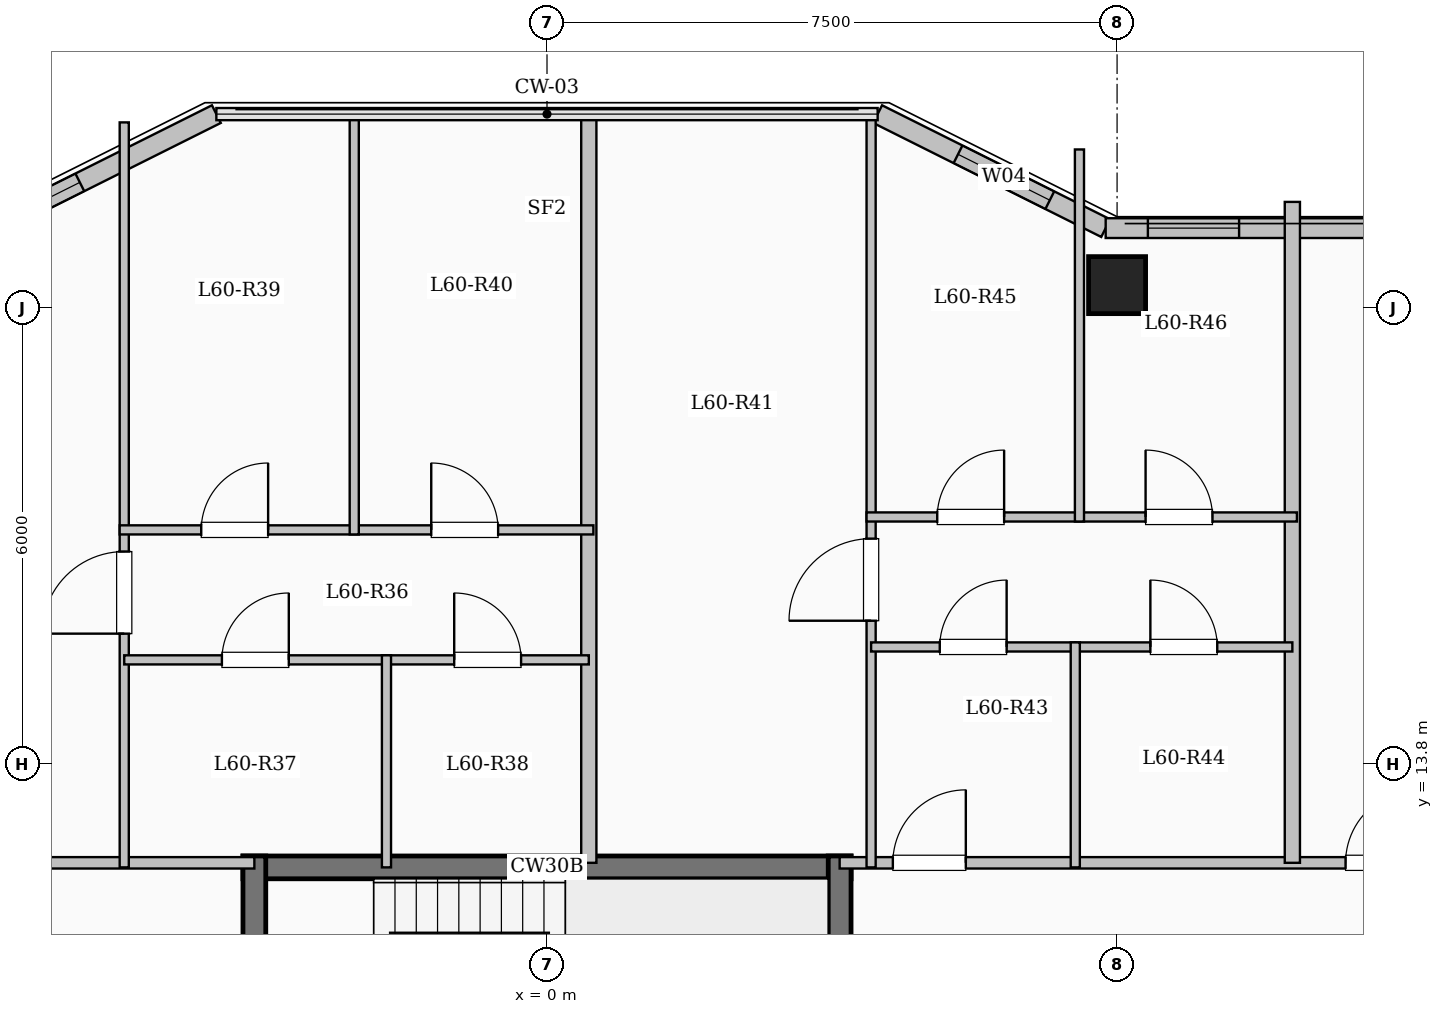
"""IFC4 building model, lengths in metres.
Left out: names, types, materials, properties, quantities, classifications, styles, units other than length and angle.
Written with IfcOpenShell. Run it as: python <this file> out.ifc"""

import sys

from ifc_helpers import new_model, si_unit, direction, frame, frame_2d, origin, origin_2d, place, context, subcontext, project, spatial, rectangle, extrude, element, fill, save


model = new_model("IFC4")
c1 = context("Model", 3, precision=1e-05, world=origin(), true_north=direction((0.0, 1.0)))
c2 = subcontext(c1, "Body", "Model", "MODEL_VIEW")
j1 = project(units=[si_unit("LENGTHUNIT", "METRE"), si_unit("PLANEANGLEUNIT", "RADIAN")], contexts=[c1])
p1 = place(None, origin())
s1 = spatial("IfcSite", under=j1, at=p1, CompositionType="ELEMENT")
p2 = place(p1, origin())
s2 = spatial("IfcBuilding", under=s1, at=p2, CompositionType="ELEMENT")
p3 = place(p2, frame((0.0, 0.0, 220.4)))
s3 = spatial("IfcBuildingStorey", under=s2, at=p3, CompositionType="ELEMENT", Elevation=220.4)
p4 = place(p3, frame((7.5, 20.1, 0.0), z_axis=(0.0, 0.0, 1.0), x_axis=(1.0, 0.0, 0.0)))
e1 = element("IfcColumn", 1, at=p4, inside=s3, PredefinedType="COLUMN", context=c2, shape_type="SweptSolid", body=[
    extrude(rectangle(XDim=0.75, YDim=0.75, at=origin_2d()), origin(), (0.0, 0.0, 1.0), 3.35),
])
p5 = place(p3, frame((-7.35, 20.85, 0.0), z_axis=(0.0, 0.0, 1.0), x_axis=(0.894427191, 0.4472135955, 0.0)))
e2 = element("IfcWall", 2, at=p5, inside=s3, PredefinedType="SOLIDWALL", context=c2, shape_type="SweptSolid", body=[
    extrude(rectangle(XDim=3.354, YDim=0.26, at=frame_2d((1.677, 0.0))), origin(), (0.0, 0.0, 1.0), 3.1),
])
p6 = place(p5, frame((0.346, 0.0, 0.95)))
e3 = element("IfcOpeningElement", 3, at=p6, cuts=e2, PredefinedType="OPENING", context=c2, shape_type="SweptSolid", body=[
    extrude(rectangle(XDim=1.0, YDim=1.5, at=frame_2d((0.5, 0.75))), frame((0.0, 0.14, 0.0), z_axis=(0.0, -1.0, 0.0), x_axis=(1.0, 0.0, 0.0)), (0.0, 0.0, 1.0), 0.28),
])
p7 = place(p3, frame((4.35, 22.35, 0.0), z_axis=(0.0, 0.0, 1.0), x_axis=(0.894427191, -0.4472135955, 0.0)))
e4 = element("IfcWall", 4, at=p7, inside=s3, PredefinedType="SOLIDWALL", context=c2, shape_type="SweptSolid", body=[
    extrude(rectangle(XDim=3.354, YDim=0.26, at=frame_2d((1.677, 0.0))), origin(), (0.0, 0.0, 1.0), 3.1),
])
p8 = place(p7, frame((1.182, 0.0, 0.95)))
e5 = element("IfcOpeningElement", 5, at=p8, cuts=e4, PredefinedType="OPENING", context=c2, shape_type="SweptSolid", body=[
    extrude(rectangle(XDim=1.35, YDim=1.55, at=frame_2d((0.675, 0.775))), frame((0.0, 0.14, 0.0), z_axis=(0.0, -1.0, 0.0), x_axis=(1.0, 0.0, 0.0)), (0.0, 0.0, 1.0), 0.28),
])
p9 = place(p3, frame((7.35, 20.85, 0.0), z_axis=(0.0, 0.0, 1.0), x_axis=(1.0, 0.0, 0.0)))
e6 = element("IfcWall", 6, at=p9, inside=s3, PredefinedType="SOLIDWALL", context=c2, shape_type="SweptSolid", body=[
    extrude(rectangle(XDim=11.1, YDim=0.26, at=frame_2d((5.55, 0.0))), origin(), (0.0, 0.0, 1.0), 3.1),
])
p10 = place(p9, frame((0.555, 0.0, 0.95)))
e7 = element("IfcOpeningElement", 7, at=p10, cuts=e6, PredefinedType="OPENING", context=c2, shape_type="SweptSolid", body=[
    extrude(rectangle(XDim=1.2, YDim=1.5, at=frame_2d((0.6, 0.75))), frame((0.0, 0.14, 0.0), z_axis=(0.0, -1.0, 0.0), x_axis=(1.0, 0.0, 0.0)), (0.0, 0.0, 1.0), 0.28),
])
p11 = place(p9, frame((3.471, 0.0, 0.9)))
e8 = element("IfcOpeningElement", 8, at=p11, cuts=e6, PredefinedType="OPENING", context=c2, shape_type="SweptSolid", body=[
    extrude(rectangle(XDim=2.2, YDim=1.75, at=frame_2d((1.1, 0.875))), frame((0.0, 0.14, 0.0), z_axis=(0.0, -1.0, 0.0), x_axis=(1.0, 0.0, 0.0)), (0.0, 0.0, 1.0), 0.28),
])
p12 = place(p9, frame((8.04, 0.0, 0.9)))
e9 = element("IfcOpeningElement", 9, at=p12, cuts=e6, PredefinedType="OPENING", context=c2, shape_type="SweptSolid", body=[
    extrude(rectangle(XDim=1.65, YDim=1.6, at=frame_2d((0.825, 0.8))), frame((0.0, 0.14, 0.0), z_axis=(0.0, -1.0, 0.0), x_axis=(1.0, 0.0, 0.0)), (0.0, 0.0, 1.0), 0.28),
])
p13 = place(p3, frame((-4.0, 12.44, 0.0), z_axis=(0.0, 0.0, 1.0), x_axis=(1.0, 0.0, 0.0)))
e10 = element("IfcWall", 10, at=p13, inside=s3, PredefinedType="SHEAR", context=c2, shape_type="SweptSolid", body=[
    extrude(rectangle(XDim=8.0, YDim=0.3, at=frame_2d((4.0, 0.0))), origin(), (0.0, 0.0, 1.0), 3.35),
])
for number, where, z_axis, x_axis in (
    (11, (-3.85, 9.0, 0.0), (0.0, 0.0, 1.0), (0.0, 1.0, 0.0)),
    (12, (3.85, 9.0, 0.0), (0.0, 0.0, 1.0), (0.0, 1.0, 0.0)),
):
    element("IfcWall", number, at=place(p3, frame(where, z_axis=z_axis, x_axis=x_axis)), inside=s3, PredefinedType="SHEAR", context=c2, shape_type="SweptSolid", body=[
        extrude(rectangle(XDim=3.59, YDim=0.3, at=frame_2d((1.795, 0.0))), origin(), (0.0, 0.0, 1.0), 3.35),
    ])
p14 = place(p3, frame((-18.35, 12.5, 0.0), z_axis=(0.0, 0.0, 1.0), x_axis=(1.0, 0.0, 0.0)))
e13 = element("IfcWall", 13, at=p14, inside=s3, PredefinedType="PARTITIONING", context=c2, shape_type="SweptSolid", body=[
    extrude(rectangle(XDim=14.5, YDim=0.15, at=frame_2d((7.25, 0.0))), origin(), (0.0, 0.0, 1.0), 3.1),
])
p15 = place(p14, frame((0.7, 0.0, 0.0)))
e14 = element("IfcOpeningElement", 14, at=p15, cuts=e13, PredefinedType="OPENING", context=c2, shape_type="SweptSolid", body=[
    extrude(rectangle(XDim=0.96, YDim=2.15, at=frame_2d((0.48, 1.075))), frame((0.0, 0.085, 0.0), z_axis=(0.0, -1.0, 0.0), x_axis=(1.0, 0.0, 0.0)), (0.0, 0.0, 1.0), 0.17),
])
p16 = place(p14, frame((9.394, 0.0, 0.0)))
e15 = element("IfcOpeningElement", 15, at=p16, cuts=e13, PredefinedType="OPENING", context=c2, shape_type="SweptSolid", body=[
    extrude(rectangle(XDim=0.96, YDim=2.15, at=frame_2d((0.48, 1.075))), frame((0.0, 0.085, 0.0), z_axis=(0.0, -1.0, 0.0), x_axis=(1.0, 0.0, 0.0)), (0.0, 0.0, 1.0), 0.17),
])
p17 = place(p3, frame((3.85, 12.5, 0.0), z_axis=(0.0, 0.0, 1.0), x_axis=(1.0, 0.0, 0.0)))
e16 = element("IfcWall", 16, at=p17, inside=s3, PredefinedType="PARTITIONING", context=c2, shape_type="SweptSolid", body=[
    extrude(rectangle(XDim=14.5, YDim=0.15, at=frame_2d((7.25, 0.0))), origin(), (0.0, 0.0, 1.0), 3.1),
])
p18 = place(p17, frame((0.7, 0.0, 0.0)))
e17 = element("IfcOpeningElement", 17, at=p18, cuts=e16, PredefinedType="OPENING", context=c2, shape_type="SweptSolid", body=[
    extrude(rectangle(XDim=0.96, YDim=2.15, at=frame_2d((0.48, 1.075))), frame((0.0, 0.085, 0.0), z_axis=(0.0, -1.0, 0.0), x_axis=(1.0, 0.0, 0.0)), (0.0, 0.0, 1.0), 0.17),
])
p19 = place(p17, frame((6.656, 0.0, 0.0)))
e18 = element("IfcOpeningElement", 18, at=p19, cuts=e16, PredefinedType="OPENING", context=c2, shape_type="SweptSolid", body=[
    extrude(rectangle(XDim=0.96, YDim=2.15, at=frame_2d((0.48, 1.075))), frame((0.0, 0.085, 0.0), z_axis=(0.0, -1.0, 0.0), x_axis=(1.0, 0.0, 0.0)), (0.0, 0.0, 1.0), 0.17),
])
p20 = place(p3, frame((0.55, 12.5, 0.0), z_axis=(0.0, 0.0, 1.0), x_axis=(0.0, 1.0, 0.0)))
e19 = element("IfcWall", 19, at=p20, inside=s3, PredefinedType="SOLIDWALL", context=c2, shape_type="SweptSolid", body=[
    extrude(rectangle(XDim=9.88, YDim=0.2, at=frame_2d((4.94, 0.0))), origin(), (0.0, 0.0, 1.0), 3.1),
])
p21 = place(p3, frame((-5.562, 12.44, 0.0), z_axis=(0.0, 0.0, 1.0), x_axis=(0.0, 1.0, 0.0)))
e20 = element("IfcWall", 20, at=p21, inside=s3, PredefinedType="PARTITIONING", context=c2, shape_type="SweptSolid", body=[
    extrude(rectangle(XDim=9.801, YDim=0.12, at=frame_2d((4.9, 0.0))), origin(), (0.0, 0.0, 1.0), 3.1),
])
p22 = place(p21, frame((3.075, 0.0, 0.0)))
e21 = element("IfcOpeningElement", 21, at=p22, cuts=e20, PredefinedType="OPENING", context=c2, shape_type="SweptSolid", body=[
    extrude(rectangle(XDim=1.08, YDim=2.15, at=frame_2d((0.54, 1.075))), frame((0.0, 0.07, 0.0), z_axis=(0.0, -1.0, 0.0), x_axis=(1.0, 0.0, 0.0)), (0.0, 0.0, 1.0), 0.14),
])
p23 = place(p3, frame((-5.562, 15.17, 0.0), z_axis=(0.0, 0.0, 1.0), x_axis=(1.0, 0.0, 0.0)))
e22 = element("IfcWall", 22, at=p23, inside=s3, PredefinedType="PARTITIONING", context=c2, shape_type="SweptSolid", body=[
    extrude(rectangle(XDim=3.45, YDim=0.12, at=frame_2d((1.725, 0.0))), origin(), (0.0, 0.0, 1.0), 3.1),
])
p24 = place(p23, frame((1.285, 0.0, 0.0)))
e23 = element("IfcOpeningElement", 23, at=p24, cuts=e22, PredefinedType="OPENING", context=c2, shape_type="SweptSolid", body=[
    extrude(rectangle(XDim=0.88, YDim=2.1, at=frame_2d((0.44, 1.05))), frame((0.0, 0.07, 0.0), z_axis=(0.0, -1.0, 0.0), x_axis=(1.0, 0.0, 0.0)), (0.0, 0.0, 1.0), 0.14),
])
p25 = place(p3, frame((-2.112, 15.17, 0.0), z_axis=(0.0, 0.0, 1.0), x_axis=(1.0, 0.0, 0.0)))
e24 = element("IfcWall", 24, at=p25, inside=s3, PredefinedType="PARTITIONING", context=c2, shape_type="SweptSolid", body=[
    extrude(rectangle(XDim=2.662, YDim=0.12, at=frame_2d((1.331, 0.0))), origin(), (0.0, 0.0, 1.0), 3.1),
])
p26 = place(p25, frame((0.891, 0.0, 0.0)))
e25 = element("IfcOpeningElement", 25, at=p26, cuts=e24, PredefinedType="OPENING", context=c2, shape_type="SweptSolid", body=[
    extrude(rectangle(XDim=0.88, YDim=2.1, at=frame_2d((0.44, 1.05))), frame((0.0, 0.07, 0.0), z_axis=(0.0, -1.0, 0.0), x_axis=(1.0, 0.0, 0.0)), (0.0, 0.0, 1.0), 0.14),
])
p27 = place(p3, frame((-5.622, 16.88, 0.0), z_axis=(0.0, 0.0, 1.0), x_axis=(1.0, 0.0, 0.0)))
e26 = element("IfcWall", 26, at=p27, inside=s3, PredefinedType="PARTITIONING", context=c2, shape_type="SweptSolid", body=[
    extrude(rectangle(XDim=6.232, YDim=0.12, at=frame_2d((3.116, 0.0))), origin(), (0.0, 0.0, 1.0), 2.725),
])
p28 = place(p27, frame((1.073, 0.0, 0.0)))
e27 = element("IfcOpeningElement", 27, at=p28, cuts=e26, PredefinedType="OPENING", context=c2, shape_type="SweptSolid", body=[
    extrude(rectangle(XDim=0.88, YDim=2.1, at=frame_2d((0.44, 1.05))), frame((0.0, 0.07, 0.0), z_axis=(0.0, -1.0, 0.0), x_axis=(1.0, 0.0, 0.0)), (0.0, 0.0, 1.0), 0.14),
])
p29 = place(p27, frame((4.099, 0.0, 0.0)))
e28 = element("IfcOpeningElement", 28, at=p29, cuts=e26, PredefinedType="OPENING", context=c2, shape_type="SweptSolid", body=[
    extrude(rectangle(XDim=0.88, YDim=2.1, at=frame_2d((0.44, 1.05))), frame((0.0, 0.07, 0.0), z_axis=(0.0, -1.0, 0.0), x_axis=(1.0, 0.0, 0.0)), (0.0, 0.0, 1.0), 0.14),
])
p30 = place(p3, frame((-2.112, 12.44, 0.0), z_axis=(0.0, 0.0, 1.0), x_axis=(0.0, 1.0, 0.0)))
e29 = element("IfcWall", 29, at=p30, inside=s3, PredefinedType="PARTITIONING", context=c2, shape_type="SweptSolid", body=[
    extrude(rectangle(XDim=2.79, YDim=0.12, at=frame_2d((1.395, 0.0))), origin(), (0.0, 0.0, 1.0), 3.1),
])
p31 = place(p3, frame((-2.536, 16.82, 0.0), z_axis=(0.0, 0.0, 1.0), x_axis=(0.0, 1.0, 0.0)))
e30 = element("IfcWall", 30, at=p31, inside=s3, PredefinedType="PARTITIONING", context=c2, shape_type="SweptSolid", body=[
    extrude(rectangle(XDim=5.56, YDim=0.12, at=frame_2d((2.78, 0.0))), origin(), (0.0, 0.0, 1.0), 3.1),
])
p32 = place(p3, frame((9.806, 12.5, 0.0), z_axis=(0.0, 0.0, 1.0), x_axis=(0.0, 1.0, 0.0)))
e31 = element("IfcWall", 31, at=p32, inside=s3, PredefinedType="SOLIDWALL", context=c2, shape_type="SweptSolid", body=[
    extrude(rectangle(XDim=8.695, YDim=0.2, at=frame_2d((4.348, 0.0))), origin(), (0.0, 0.0, 1.0), 3.1),
])
p33 = place(p3, frame((4.264, 12.44, 0.0), z_axis=(0.0, 0.0, 1.0), x_axis=(0.0, 1.0, 0.0)))
e32 = element("IfcWall", 32, at=p33, inside=s3, PredefinedType="PARTITIONING", context=c2, shape_type="SweptSolid", body=[
    extrude(rectangle(XDim=9.94, YDim=0.12, at=frame_2d((4.97, 0.0))), origin(), (0.0, 0.0, 1.0), 3.1),
])
p34 = place(p33, frame((3.245, 0.0, 0.0)))
e33 = element("IfcOpeningElement", 33, at=p34, cuts=e32, PredefinedType="OPENING", context=c2, shape_type="SweptSolid", body=[
    extrude(rectangle(XDim=1.08, YDim=2.15, at=frame_2d((0.54, 1.075))), frame((0.0, 0.07, 0.0), z_axis=(0.0, -1.0, 0.0), x_axis=(1.0, 0.0, 0.0)), (0.0, 0.0, 1.0), 0.14),
])
p35 = place(p3, frame((4.264, 15.34, 0.0), z_axis=(0.0, 0.0, 1.0), x_axis=(1.0, 0.0, 0.0)))
e34 = element("IfcWall", 34, at=p35, inside=s3, PredefinedType="PARTITIONING", context=c2, shape_type="SweptSolid", body=[
    extrude(rectangle(XDim=2.686, YDim=0.12, at=frame_2d((1.343, 0.0))), origin(), (0.0, 0.0, 1.0), 2.725),
])
p36 = place(p35, frame((0.903, 0.0, 0.0)))
e35 = element("IfcOpeningElement", 35, at=p36, cuts=e34, PredefinedType="OPENING", context=c2, shape_type="SweptSolid", body=[
    extrude(rectangle(XDim=0.88, YDim=2.1, at=frame_2d((0.44, 1.05))), frame((0.0, 0.07, 0.0), z_axis=(0.0, -1.0, 0.0), x_axis=(1.0, 0.0, 0.0)), (0.0, 0.0, 1.0), 0.14),
])
p37 = place(p3, frame((6.95, 15.34, 0.0), z_axis=(0.0, 0.0, 1.0), x_axis=(1.0, 0.0, 0.0)))
e36 = element("IfcWall", 36, at=p37, inside=s3, PredefinedType="PARTITIONING", context=c2, shape_type="SweptSolid", body=[
    extrude(rectangle(XDim=2.856, YDim=0.12, at=frame_2d((1.428, 0.0))), origin(), (0.0, 0.0, 1.0), 2.725),
])
p38 = place(p37, frame((0.988, 0.0, 0.0)))
e37 = element("IfcOpeningElement", 37, at=p38, cuts=e36, PredefinedType="OPENING", context=c2, shape_type="SweptSolid", body=[
    extrude(rectangle(XDim=0.88, YDim=2.1, at=frame_2d((0.44, 1.05))), frame((0.0, 0.07, 0.0), z_axis=(0.0, -1.0, 0.0), x_axis=(1.0, 0.0, 0.0)), (0.0, 0.0, 1.0), 0.14),
])
p39 = place(p3, frame((4.204, 17.05, 0.0), z_axis=(0.0, 0.0, 1.0), x_axis=(1.0, 0.0, 0.0)))
e38 = element("IfcWall", 38, at=p39, inside=s3, PredefinedType="PARTITIONING", context=c2, shape_type="SweptSolid", body=[
    extrude(rectangle(XDim=5.662, YDim=0.12, at=frame_2d((2.831, 0.0))), origin(), (0.0, 0.0, 1.0), 2.725),
])
p40 = place(p39, frame((0.93, 0.0, 0.0)))
e39 = element("IfcOpeningElement", 39, at=p40, cuts=e38, PredefinedType="OPENING", context=c2, shape_type="SweptSolid", body=[
    extrude(rectangle(XDim=0.88, YDim=2.1, at=frame_2d((0.44, 1.05))), frame((0.0, 0.07, 0.0), z_axis=(0.0, -1.0, 0.0), x_axis=(1.0, 0.0, 0.0)), (0.0, 0.0, 1.0), 0.14),
])
p41 = place(p39, frame((3.671, 0.0, 0.0)))
e40 = element("IfcOpeningElement", 40, at=p41, cuts=e38, PredefinedType="OPENING", context=c2, shape_type="SweptSolid", body=[
    extrude(rectangle(XDim=0.88, YDim=2.1, at=frame_2d((0.44, 1.05))), frame((0.0, 0.07, 0.0), z_axis=(0.0, -1.0, 0.0), x_axis=(1.0, 0.0, 0.0)), (0.0, 0.0, 1.0), 0.14),
])
p42 = place(p3, frame((6.95, 12.44, 0.0), z_axis=(0.0, 0.0, 1.0), x_axis=(0.0, 1.0, 0.0)))
e41 = element("IfcWall", 41, at=p42, inside=s3, PredefinedType="PARTITIONING", context=c2, shape_type="SweptSolid", body=[
    extrude(rectangle(XDim=2.96, YDim=0.12, at=frame_2d((1.48, 0.0))), origin(), (0.0, 0.0, 1.0), 3.1),
])
p43 = place(p3, frame((7.005, 16.99, 0.0), z_axis=(0.0, 0.0, 1.0), x_axis=(0.0, 1.0, 0.0)))
e42 = element("IfcWall", 42, at=p43, inside=s3, PredefinedType="PARTITIONING", context=c2, shape_type="SweptSolid", body=[
    extrude(rectangle(XDim=4.895, YDim=0.12, at=frame_2d((2.448, 0.0))), origin(), (0.0, 0.0, 1.0), 3.1),
])
p44 = place(p6, origin())
e43 = element("IfcWindow", 43, at=p44, inside=s3, PartitioningType="SINGLE_PANEL", PredefinedType="WINDOW", context=c2, shape_type="SweptSolid", body=[
    extrude(rectangle(XDim=1.0, YDim=1.5, at=frame_2d((0.5, 0.75))), frame((0.0, 0.03, 0.0), z_axis=(0.0, -1.0, 0.0), x_axis=(1.0, 0.0, 0.0)), (0.0, 0.0, 1.0), 0.06),
])
fill(e3, e43)
p45 = place(p8, origin())
e44 = element("IfcWindow", 44, at=p45, inside=s3, PartitioningType="SINGLE_PANEL", PredefinedType="WINDOW", context=c2, shape_type="SweptSolid", body=[
    extrude(rectangle(XDim=1.35, YDim=1.55, at=frame_2d((0.675, 0.775))), frame((0.0, 0.03, 0.0), z_axis=(0.0, -1.0, 0.0), x_axis=(1.0, 0.0, 0.0)), (0.0, 0.0, 1.0), 0.06),
])
fill(e5, e44)
p46 = place(p10, origin())
e45 = element("IfcWindow", 45, at=p46, inside=s3, PartitioningType="SINGLE_PANEL", PredefinedType="WINDOW", context=c2, shape_type="SweptSolid", body=[
    extrude(rectangle(XDim=1.2, YDim=1.5, at=frame_2d((0.6, 0.75))), frame((0.0, 0.03, 0.0), z_axis=(0.0, -1.0, 0.0), x_axis=(1.0, 0.0, 0.0)), (0.0, 0.0, 1.0), 0.06),
])
fill(e7, e45)
p47 = place(p22, origin())
e46 = element("IfcDoor", 46, at=p47, inside=s3, OperationType="SINGLE_SWING_LEFT", PredefinedType="DOOR", context=c2, shape_type="SweptSolid", body=[
    extrude(rectangle(XDim=1.08, YDim=2.15, at=frame_2d((0.54, 1.075))), frame((0.0, 0.025, 0.0), z_axis=(0.0, -1.0, 0.0), x_axis=(1.0, 0.0, 0.0)), (0.0, 0.0, 1.0), 0.05),
])
fill(e21, e46)
p48 = place(p24, origin())
e47 = element("IfcDoor", 47, at=p48, inside=s3, OperationType="SINGLE_SWING_RIGHT", PredefinedType="DOOR", context=c2, shape_type="SweptSolid", body=[
    extrude(rectangle(XDim=0.88, YDim=2.1, at=frame_2d((0.44, 1.05))), frame((0.0, 0.025, 0.0), z_axis=(0.0, -1.0, 0.0), x_axis=(1.0, 0.0, 0.0)), (0.0, 0.0, 1.0), 0.05),
])
fill(e23, e47)
p49 = place(p26, origin())
e48 = element("IfcDoor", 48, at=p49, inside=s3, OperationType="SINGLE_SWING_LEFT", PredefinedType="DOOR", context=c2, shape_type="SweptSolid", body=[
    extrude(rectangle(XDim=0.88, YDim=2.1, at=frame_2d((0.44, 1.05))), frame((0.0, 0.025, 0.0), z_axis=(0.0, -1.0, 0.0), x_axis=(1.0, 0.0, 0.0)), (0.0, 0.0, 1.0), 0.05),
])
fill(e25, e48)
p50 = place(p28, origin())
e49 = element("IfcDoor", 49, at=p50, inside=s3, OperationType="SINGLE_SWING_RIGHT", PredefinedType="DOOR", context=c2, shape_type="SweptSolid", body=[
    extrude(rectangle(XDim=0.88, YDim=2.1, at=frame_2d((0.44, 1.05))), frame((0.0, 0.025, 0.0), z_axis=(0.0, -1.0, 0.0), x_axis=(1.0, 0.0, 0.0)), (0.0, 0.0, 1.0), 0.05),
])
fill(e27, e49)
p51 = place(p29, origin())
e50 = element("IfcDoor", 50, at=p51, inside=s3, OperationType="SINGLE_SWING_LEFT", PredefinedType="DOOR", context=c2, shape_type="SweptSolid", body=[
    extrude(rectangle(XDim=0.88, YDim=2.1, at=frame_2d((0.44, 1.05))), frame((0.0, 0.025, 0.0), z_axis=(0.0, -1.0, 0.0), x_axis=(1.0, 0.0, 0.0)), (0.0, 0.0, 1.0), 0.05),
])
fill(e28, e50)
p52 = place(p18, origin())
e51 = element("IfcDoor", 51, at=p52, inside=s3, OperationType="SINGLE_SWING_RIGHT", PredefinedType="DOOR", context=c2, shape_type="SweptSolid", body=[
    extrude(rectangle(XDim=0.96, YDim=2.15, at=frame_2d((0.48, 1.075))), frame((0.0, 0.025, 0.0), z_axis=(0.0, -1.0, 0.0), x_axis=(1.0, 0.0, 0.0)), (0.0, 0.0, 1.0), 0.05),
])
fill(e17, e51)
p53 = place(p34, origin())
e52 = element("IfcDoor", 52, at=p53, inside=s3, OperationType="SINGLE_SWING_LEFT", PredefinedType="DOOR", context=c2, shape_type="SweptSolid", body=[
    extrude(rectangle(XDim=1.08, YDim=2.15, at=frame_2d((0.54, 1.075))), frame((0.0, 0.025, 0.0), z_axis=(0.0, -1.0, 0.0), x_axis=(1.0, 0.0, 0.0)), (0.0, 0.0, 1.0), 0.05),
])
fill(e33, e52)
p54 = place(p36, origin())
e53 = element("IfcDoor", 53, at=p54, inside=s3, OperationType="SINGLE_SWING_RIGHT", PredefinedType="DOOR", context=c2, shape_type="SweptSolid", body=[
    extrude(rectangle(XDim=0.88, YDim=2.1, at=frame_2d((0.44, 1.05))), frame((0.0, 0.025, 0.0), z_axis=(0.0, -1.0, 0.0), x_axis=(1.0, 0.0, 0.0)), (0.0, 0.0, 1.0), 0.05),
])
fill(e35, e53)
p55 = place(p38, origin())
e54 = element("IfcDoor", 54, at=p55, inside=s3, OperationType="SINGLE_SWING_LEFT", PredefinedType="DOOR", context=c2, shape_type="SweptSolid", body=[
    extrude(rectangle(XDim=0.88, YDim=2.1, at=frame_2d((0.44, 1.05))), frame((0.0, 0.025, 0.0), z_axis=(0.0, -1.0, 0.0), x_axis=(1.0, 0.0, 0.0)), (0.0, 0.0, 1.0), 0.05),
])
fill(e37, e54)
p56 = place(p40, origin())
e55 = element("IfcDoor", 55, at=p56, inside=s3, OperationType="SINGLE_SWING_RIGHT", PredefinedType="DOOR", context=c2, shape_type="SweptSolid", body=[
    extrude(rectangle(XDim=0.88, YDim=2.1, at=frame_2d((0.44, 1.05))), frame((0.0, 0.025, 0.0), z_axis=(0.0, -1.0, 0.0), x_axis=(1.0, 0.0, 0.0)), (0.0, 0.0, 1.0), 0.05),
])
fill(e39, e55)
p57 = place(p41, origin())
e56 = element("IfcDoor", 56, at=p57, inside=s3, OperationType="SINGLE_SWING_LEFT", PredefinedType="DOOR", context=c2, shape_type="SweptSolid", body=[
    extrude(rectangle(XDim=0.88, YDim=2.1, at=frame_2d((0.44, 1.05))), frame((0.0, 0.025, 0.0), z_axis=(0.0, -1.0, 0.0), x_axis=(1.0, 0.0, 0.0)), (0.0, 0.0, 1.0), 0.05),
])
fill(e40, e56)
p58 = place(p19, origin())
e57 = element("IfcDoor", 57, at=p58, inside=s3, OperationType="SINGLE_SWING_RIGHT", PredefinedType="DOOR", context=c2, shape_type="SweptSolid", body=[
    extrude(rectangle(XDim=0.96, YDim=2.15, at=frame_2d((0.48, 1.075))), frame((0.0, 0.025, 0.0), z_axis=(0.0, -1.0, 0.0), x_axis=(1.0, 0.0, 0.0)), (0.0, 0.0, 1.0), 0.05),
])
fill(e18, e57)
save(model, sys.argv[1])
